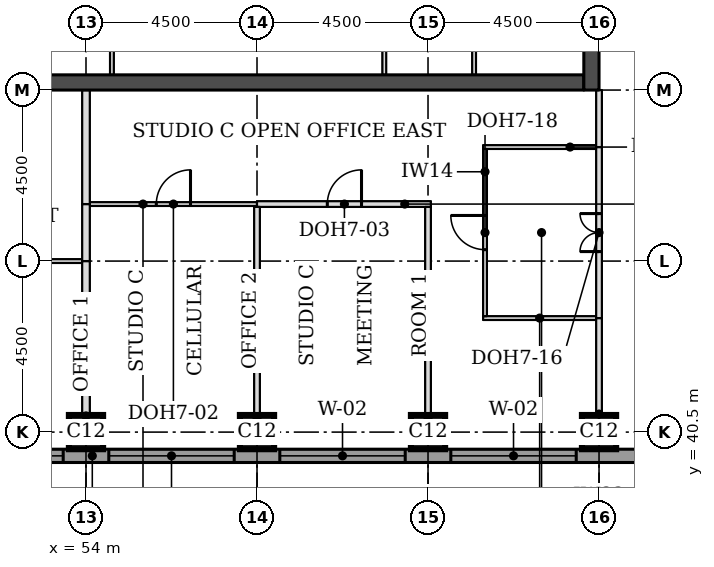
"""IFC4 building model, lengths in metres.
Left out: names, types, materials, properties, quantities, classifications, styles, units other than length and angle.
Written with IfcOpenShell. Run it as: python <this file> out.ifc"""

import sys

from ifc_helpers import new_model, si_unit, direction, frame, frame_2d, origin, origin_2d, place, context, subcontext, project, spatial, rectangle, extrude, element, fill, save


model = new_model("IFC4")
c1 = context("Model", 3, precision=1e-05, world=origin(), true_north=direction((0.0, 1.0)))
c2 = subcontext(c1, "Body", "Model", "MODEL_VIEW")
j1 = project(units=[si_unit("LENGTHUNIT", "METRE"), si_unit("PLANEANGLEUNIT", "RADIAN")], contexts=[c1])
p1 = place(None, origin())
s1 = spatial("IfcSite", under=j1, at=p1, CompositionType="ELEMENT")
p2 = place(p1, origin())
s2 = spatial("IfcBuilding", under=s1, at=p2, CompositionType="ELEMENT")
p3 = place(p2, frame((0.0, 0.0, 192.1)))
s3 = spatial("IfcBuildingStorey", under=s2, at=p3, CompositionType="ELEMENT", Elevation=192.1)
for number, where, z_axis, x_axis in (
    (1, (54.0, 40.5, 0.0), (0.0, 0.0, 1.0), (1.0, 0.0, 0.0)),
    (2, (58.5, 40.5, 0.0), (0.0, 0.0, 1.0), (1.0, 0.0, 0.0)),
    (3, (63.0, 40.5, 0.0), (0.0, 0.0, 1.0), (1.0, 0.0, 0.0)),
    (4, (67.5, 40.5, 0.0), (0.0, 0.0, 1.0), (1.0, 0.0, 0.0)),
):
    element("IfcColumn", number, at=place(p3, frame(where, z_axis=z_axis, x_axis=x_axis)), inside=s3, PredefinedType="COLUMN", context=c2, shape_type="SweptSolid", body=[
        extrude(rectangle(XDim=0.9, YDim=0.9, at=origin_2d()), origin(), (0.0, 0.0, 1.0), 3.7),
    ])
p4 = place(p3, frame((45.4, 49.7, 0.0), z_axis=(0.0, 0.0, 1.0), x_axis=(1.0, 0.0, 0.0)))
e5 = element("IfcWall", 5, at=p4, inside=s3, PredefinedType="SHEAR", context=c2, shape_type="SweptSolid", body=[
    extrude(rectangle(XDim=21.7, YDim=0.4, at=frame_2d((10.85, 0.0))), origin(), (0.0, 0.0, 1.0), 3.7),
])
p5 = place(p3, frame((67.3, 49.5, 0.0), z_axis=(0.0, 0.0, 1.0), x_axis=(0.0, 1.0, 0.0)))
e6 = element("IfcWall", 6, at=p5, inside=s3, PredefinedType="SHEAR", context=c2, shape_type="SweptSolid", body=[
    extrude(rectangle(XDim=22.5, YDim=0.4, at=frame_2d((11.25, 0.0))), origin(), (0.0, 0.0, 1.0), 3.7),
])
p6 = place(p5, frame((4.2, 0.0, 0.0)))
e7 = element("IfcOpeningElement", 7, at=p6, cuts=e6, PredefinedType="OPENING", context=c2, shape_type="SweptSolid", body=[
    extrude(rectangle(XDim=1.8, YDim=2.1, at=frame_2d((0.9, 1.05))), frame((0.0, 0.21, 0.0), z_axis=(0.0, -1.0, 0.0), x_axis=(1.0, 0.0, 0.0)), (0.0, 0.0, 1.0), 0.42),
])
p7 = place(p5, frame((6.9, 0.0, 0.0)))
e8 = element("IfcOpeningElement", 8, at=p7, cuts=e6, PredefinedType="OPENING", context=c2, shape_type="SweptSolid", body=[
    extrude(rectangle(XDim=1.1, YDim=2.1, at=frame_2d((0.55, 1.05))), frame((0.0, 0.21, 0.0), z_axis=(0.0, -1.0, 0.0), x_axis=(1.0, 0.0, 0.0)), (0.0, 0.0, 1.0), 0.42),
])
p8 = place(p5, frame((13.6, 0.0, 0.0)))
e9 = element("IfcOpeningElement", 9, at=p8, cuts=e6, PredefinedType="OPENING", context=c2, shape_type="SweptSolid", body=[
    extrude(rectangle(XDim=1.1, YDim=2.1, at=frame_2d((0.55, 1.05))), frame((0.0, 0.21, 0.0), z_axis=(0.0, -1.0, 0.0), x_axis=(1.0, 0.0, 0.0)), (0.0, 0.0, 1.0), 0.42),
])
p9 = place(p5, frame((16.5, 0.0, 0.0)))
e10 = element("IfcOpeningElement", 10, at=p9, cuts=e6, PredefinedType="OPENING", context=c2, shape_type="SweptSolid", body=[
    extrude(rectangle(XDim=1.8, YDim=2.1, at=frame_2d((0.9, 1.05))), frame((0.0, 0.21, 0.0), z_axis=(0.0, -1.0, 0.0), x_axis=(1.0, 0.0, 0.0)), (0.0, 0.0, 1.0), 0.42),
])
p10 = place(p3, frame((36.0, 39.875, 0.0), z_axis=(0.0, 0.0, 1.0), x_axis=(1.0, 0.0, 0.0)))
e11 = element("IfcWall", 11, at=p10, inside=s3, PredefinedType="STANDARD", context=c2, shape_type="SweptSolid", body=[
    extrude(rectangle(XDim=36.331, YDim=0.35, at=frame_2d((18.166, 0.0))), origin(), (0.0, 0.0, 1.0), 3.525),
])
p11 = place(p10, frame((5.1, 0.0, 0.9)))
e12 = element("IfcOpeningElement", 12, at=p11, cuts=e11, PredefinedType="OPENING", context=c2, shape_type="SweptSolid", body=[
    extrude(rectangle(XDim=3.3, YDim=1.9, at=frame_2d((1.65, 0.95))), frame((0.0, 0.185, 0.0), z_axis=(0.0, -1.0, 0.0), x_axis=(1.0, 0.0, 0.0)), (0.0, 0.0, 1.0), 0.37),
])
p12 = place(p10, frame((9.6, 0.0, 0.9)))
e13 = element("IfcOpeningElement", 13, at=p12, cuts=e11, PredefinedType="OPENING", context=c2, shape_type="SweptSolid", body=[
    extrude(rectangle(XDim=3.3, YDim=1.9, at=frame_2d((1.65, 0.95))), frame((0.0, 0.185, 0.0), z_axis=(0.0, -1.0, 0.0), x_axis=(1.0, 0.0, 0.0)), (0.0, 0.0, 1.0), 0.37),
])
p13 = place(p10, frame((14.1, 0.0, 0.9)))
e14 = element("IfcOpeningElement", 14, at=p13, cuts=e11, PredefinedType="OPENING", context=c2, shape_type="SweptSolid", body=[
    extrude(rectangle(XDim=3.3, YDim=1.9, at=frame_2d((1.65, 0.95))), frame((0.0, 0.185, 0.0), z_axis=(0.0, -1.0, 0.0), x_axis=(1.0, 0.0, 0.0)), (0.0, 0.0, 1.0), 0.37),
])
p14 = place(p10, frame((18.6, 0.0, 0.9)))
e15 = element("IfcOpeningElement", 15, at=p14, cuts=e11, PredefinedType="OPENING", context=c2, shape_type="SweptSolid", body=[
    extrude(rectangle(XDim=3.3, YDim=1.9, at=frame_2d((1.65, 0.95))), frame((0.0, 0.185, 0.0), z_axis=(0.0, -1.0, 0.0), x_axis=(1.0, 0.0, 0.0)), (0.0, 0.0, 1.0), 0.37),
])
p15 = place(p10, frame((23.1, 0.0, 0.9)))
e16 = element("IfcOpeningElement", 16, at=p15, cuts=e11, PredefinedType="OPENING", context=c2, shape_type="SweptSolid", body=[
    extrude(rectangle(XDim=3.3, YDim=1.9, at=frame_2d((1.65, 0.95))), frame((0.0, 0.185, 0.0), z_axis=(0.0, -1.0, 0.0), x_axis=(1.0, 0.0, 0.0)), (0.0, 0.0, 1.0), 0.37),
])
p16 = place(p10, frame((27.6, 0.0, 0.9)))
e17 = element("IfcOpeningElement", 17, at=p16, cuts=e11, PredefinedType="OPENING", context=c2, shape_type="SweptSolid", body=[
    extrude(rectangle(XDim=3.3, YDim=1.9, at=frame_2d((1.65, 0.95))), frame((0.0, 0.185, 0.0), z_axis=(0.0, -1.0, 0.0), x_axis=(1.0, 0.0, 0.0)), (0.0, 0.0, 1.0), 0.37),
])
p17 = place(p3, frame((64.45, 43.5, 0.0), z_axis=(0.0, 0.0, 1.0), x_axis=(1.0, 0.0, 0.0)))
e18 = element("IfcWall", 18, at=p17, inside=s3, PredefinedType="PARTITIONING", context=c2, shape_type="SweptSolid", body=[
    extrude(rectangle(XDim=2.975, YDim=0.1, at=frame_2d((1.488, 0.0))), origin(), (0.0, 0.0, 1.0), 3.55),
])
p18 = place(p3, frame((49.45, 45.0, 0.0), z_axis=(0.0, 0.0, 1.0), x_axis=(1.0, 0.0, 0.0)))
e19 = element("IfcWall", 19, at=p18, inside=s3, PredefinedType="PARTITIONING", context=c2, shape_type="SweptSolid", body=[
    extrude(rectangle(XDim=4.45, YDim=0.1, at=frame_2d((2.225, 0.0))), origin(), (0.0, 0.0, 1.0), 3.55),
])
p19 = place(p3, frame((54.1, 46.5, 0.0), z_axis=(0.0, 0.0, 1.0), x_axis=(1.0, 0.0, 0.0)))
e20 = element("IfcWall", 20, at=p19, inside=s3, PredefinedType="PARTITIONING", context=c2, shape_type="SweptSolid", body=[
    extrude(rectangle(XDim=4.4, YDim=0.1, at=frame_2d((2.2, 0.0))), origin(), (0.0, 0.0, 1.0), 3.55),
])
p20 = place(p19, frame((1.75, 0.0, 0.0)))
e21 = element("IfcOpeningElement", 21, at=p20, cuts=e20, PredefinedType="OPENING", context=c2, shape_type="SweptSolid", body=[
    extrude(rectangle(XDim=0.9, YDim=2.1, at=frame_2d((0.45, 1.05))), frame((0.0, 0.06, 0.0), z_axis=(0.0, -1.0, 0.0), x_axis=(1.0, 0.0, 0.0)), (0.0, 0.0, 1.0), 0.12),
])
p21 = place(p3, frame((58.5, 46.5, 0.0), z_axis=(0.0, 0.0, 1.0), x_axis=(1.0, 0.0, 0.0)))
e22 = element("IfcWall", 22, at=p21, inside=s3, PredefinedType="PARTITIONING", context=c2, shape_type="SweptSolid", body=[
    extrude(rectangle(XDim=4.575, YDim=0.15, at=frame_2d((2.288, 0.0))), origin(), (0.0, 0.0, 1.0), 3.55),
])
p22 = place(p21, frame((1.85, 0.0, 0.0)))
e23 = element("IfcOpeningElement", 23, at=p22, cuts=e22, PredefinedType="OPENING", context=c2, shape_type="SweptSolid", body=[
    extrude(rectangle(XDim=0.9, YDim=2.1, at=frame_2d((0.45, 1.05))), frame((0.0, 0.085, 0.0), z_axis=(0.0, -1.0, 0.0), x_axis=(1.0, 0.0, 0.0)), (0.0, 0.0, 1.0), 0.17),
])
p23 = place(p3, frame((64.45, 48.0, 0.0), z_axis=(0.0, 0.0, 1.0), x_axis=(1.0, 0.0, 0.0)))
e24 = element("IfcWall", 24, at=p23, inside=s3, PredefinedType="PARTITIONING", context=c2, shape_type="SweptSolid", body=[
    extrude(rectangle(XDim=2.975, YDim=0.1, at=frame_2d((1.488, 0.0))), origin(), (0.0, 0.0, 1.0), 3.55),
])
p24 = place(p3, frame((54.0, 40.05, 0.0), z_axis=(0.0, 0.0, 1.0), x_axis=(0.0, 1.0, 0.0)))
e25 = element("IfcWall", 25, at=p24, inside=s3, PredefinedType="PARTITIONING", context=c2, shape_type="SweptSolid", body=[
    extrude(rectangle(XDim=4.95, YDim=0.2, at=frame_2d((2.475, 0.0))), origin(), (0.0, 0.0, 1.0), 3.55),
])
for number, where, z_axis, x_axis in (
    (26, (58.5, 40.05, 0.0), (0.0, 0.0, 1.0), (0.0, 1.0, 0.0)),
    (27, (63.0, 40.05, 0.0), (0.0, 0.0, 1.0), (0.0, 1.0, 0.0)),
):
    element("IfcWall", number, at=place(p3, frame(where, z_axis=z_axis, x_axis=x_axis)), inside=s3, PredefinedType="PARTITIONING", context=c2, shape_type="SweptSolid", body=[
        extrude(rectangle(XDim=6.375, YDim=0.15, at=frame_2d((3.188, 0.0))), origin(), (0.0, 0.0, 1.0), 3.55),
    ])
p25 = place(p3, frame((67.5, 40.05, 0.0), z_axis=(0.0, 0.0, 1.0), x_axis=(0.0, 1.0, 0.0)))
e28 = element("IfcWall", 28, at=p25, inside=s3, PredefinedType="PARTITIONING", context=c2, shape_type="SweptSolid", body=[
    extrude(rectangle(XDim=3.45, YDim=0.15, at=frame_2d((1.725, 0.0))), origin(), (0.0, 0.0, 1.0), 3.022),
])
p26 = place(p3, frame((67.5, 43.5, 0.0), z_axis=(0.0, 0.0, 1.0), x_axis=(0.0, 1.0, 0.0)))
e29 = element("IfcWall", 29, at=p26, inside=s3, PredefinedType="PARTITIONING", context=c2, shape_type="SweptSolid", body=[
    extrude(rectangle(XDim=4.5, YDim=0.15, at=frame_2d((2.25, 0.0))), origin(), (0.0, 0.0, 1.0), 3.022),
])
p27 = place(p26, frame((1.75, 0.0, 0.0)))
e30 = element("IfcOpeningElement", 30, at=p27, cuts=e29, PredefinedType="OPENING", context=c2, shape_type="SweptSolid", body=[
    extrude(rectangle(XDim=1.0, YDim=2.1, at=frame_2d((0.5, 1.05))), frame((0.0, 0.085, 0.0), z_axis=(0.0, -1.0, 0.0), x_axis=(1.0, 0.0, 0.0)), (0.0, 0.0, 1.0), 0.17),
])
p28 = place(p3, frame((64.5, 43.55, 0.0), z_axis=(0.0, 0.0, 1.0), x_axis=(0.0, 1.0, 0.0)))
e31 = element("IfcWall", 31, at=p28, inside=s3, PredefinedType="PARTITIONING", context=c2, shape_type="SweptSolid", body=[
    extrude(rectangle(XDim=4.4, YDim=0.1, at=frame_2d((2.2, 0.0))), origin(), (0.0, 0.0, 1.0), 3.55),
])
p29 = place(p28, frame((1.75, 0.0, 0.0)))
e32 = element("IfcOpeningElement", 32, at=p29, cuts=e31, PredefinedType="OPENING", context=c2, shape_type="SweptSolid", body=[
    extrude(rectangle(XDim=0.9, YDim=2.1, at=frame_2d((0.45, 1.05))), frame((0.0, 0.06, 0.0), z_axis=(0.0, -1.0, 0.0), x_axis=(1.0, 0.0, 0.0)), (0.0, 0.0, 1.0), 0.12),
])
p30 = place(p3, frame((54.0, 45.0, 0.0), z_axis=(0.0, 0.0, 1.0), x_axis=(0.0, 1.0, 0.0)))
e33 = element("IfcWall", 33, at=p30, inside=s3, PredefinedType="PARTITIONING", context=c2, shape_type="SweptSolid", body=[
    extrude(rectangle(XDim=1.5, YDim=0.2, at=frame_2d((0.75, 0.0))), origin(), (0.0, 0.0, 1.0), 3.55),
])
p31 = place(p3, frame((54.0, 46.5, 0.0), z_axis=(0.0, 0.0, 1.0), x_axis=(0.0, 1.0, 0.0)))
e34 = element("IfcWall", 34, at=p31, inside=s3, PredefinedType="PARTITIONING", context=c2, shape_type="SweptSolid", body=[
    extrude(rectangle(XDim=3.0, YDim=0.2, at=frame_2d((1.5, 0.0))), origin(), (0.0, 0.0, 1.0), 3.55),
])
p32 = place(p3, frame((67.5, 48.0, 0.0), z_axis=(0.0, 0.0, 1.0), x_axis=(0.0, 1.0, 0.0)))
e35 = element("IfcWall", 35, at=p32, inside=s3, PredefinedType="PARTITIONING", context=c2, shape_type="SweptSolid", body=[
    extrude(rectangle(XDim=1.5, YDim=0.15, at=frame_2d((0.75, 0.0))), origin(), (0.0, 0.0, 1.0), 3.022),
])
for number, where, z_axis, x_axis in (
    (36, (54.682, 49.9, 0.0), (0.0, 0.0, 1.0), (0.0, 1.0, 0.0)),
    (37, (61.85, 49.9, 0.0), (0.0, 0.0, 1.0), (0.0, 1.0, 0.0)),
    (38, (64.212, 49.9, 0.0), (0.0, 0.0, 1.0), (0.0, 1.0, 0.0)),
):
    element("IfcWall", number, at=place(p3, frame(where, z_axis=z_axis, x_axis=x_axis)), inside=s3, PredefinedType="PARTITIONING", context=c2, shape_type="SweptSolid", body=[
        extrude(rectangle(XDim=3.1, YDim=0.1, at=frame_2d((1.55, 0.0))), origin(), (0.0, 0.0, 1.0), 3.55),
    ])
p33 = place(p13, origin())
e39 = element("IfcWindow", 39, at=p33, inside=s3, PartitioningType="SINGLE_PANEL", PredefinedType="WINDOW", context=c2, shape_type="SweptSolid", body=[
    extrude(rectangle(XDim=3.3, YDim=1.9, at=frame_2d((1.65, 0.95))), frame((0.0, 0.085, 0.0), z_axis=(0.0, -1.0, 0.0), x_axis=(1.0, 0.0, 0.0)), (0.0, 0.0, 1.0), 0.06),
])
fill(e14, e39)
p34 = place(p14, origin())
e40 = element("IfcWindow", 40, at=p34, inside=s3, PartitioningType="SINGLE_PANEL", PredefinedType="WINDOW", context=c2, shape_type="SweptSolid", body=[
    extrude(rectangle(XDim=3.3, YDim=1.9, at=frame_2d((1.65, 0.95))), frame((0.0, 0.085, 0.0), z_axis=(0.0, -1.0, 0.0), x_axis=(1.0, 0.0, 0.0)), (0.0, 0.0, 1.0), 0.06),
])
fill(e15, e40)
p35 = place(p15, origin())
e41 = element("IfcWindow", 41, at=p35, inside=s3, PartitioningType="SINGLE_PANEL", PredefinedType="WINDOW", context=c2, shape_type="SweptSolid", body=[
    extrude(rectangle(XDim=3.3, YDim=1.9, at=frame_2d((1.65, 0.95))), frame((0.0, 0.085, 0.0), z_axis=(0.0, -1.0, 0.0), x_axis=(1.0, 0.0, 0.0)), (0.0, 0.0, 1.0), 0.06),
])
fill(e16, e41)
p36 = place(p16, origin())
e42 = element("IfcWindow", 42, at=p36, inside=s3, PartitioningType="SINGLE_PANEL", PredefinedType="WINDOW", context=c2, shape_type="SweptSolid", body=[
    extrude(rectangle(XDim=3.3, YDim=1.9, at=frame_2d((1.65, 0.95))), frame((0.0, 0.085, 0.0), z_axis=(0.0, -1.0, 0.0), x_axis=(1.0, 0.0, 0.0)), (0.0, 0.0, 1.0), 0.06),
])
fill(e17, e42)
p37 = place(p27, origin())
e43 = element("IfcDoor", 43, at=p37, inside=s3, OperationType="DOUBLE_DOOR_SINGLE_SWING", PredefinedType="DOOR", context=c2, shape_type="SweptSolid", body=[
    extrude(rectangle(XDim=1.0, YDim=2.1, at=frame_2d((0.5, 1.05))), frame((0.0, 0.025, 0.0), z_axis=(0.0, -1.0, 0.0), x_axis=(1.0, 0.0, 0.0)), (0.0, 0.0, 1.0), 0.05),
])
fill(e30, e43)
p38 = place(p29, origin())
e44 = element("IfcDoor", 44, at=p38, inside=s3, OperationType="SINGLE_SWING_RIGHT", PredefinedType="DOOR", context=c2, shape_type="SweptSolid", body=[
    extrude(rectangle(XDim=0.9, YDim=2.1, at=frame_2d((0.45, 1.05))), frame((0.0, 0.025, 0.0), z_axis=(0.0, -1.0, 0.0), x_axis=(1.0, 0.0, 0.0)), (0.0, 0.0, 1.0), 0.05),
])
fill(e32, e44)
p39 = place(p20, origin())
e45 = element("IfcDoor", 45, at=p39, inside=s3, OperationType="SINGLE_SWING_RIGHT", PredefinedType="DOOR", context=c2, shape_type="SweptSolid", body=[
    extrude(rectangle(XDim=0.9, YDim=2.1, at=frame_2d((0.45, 1.05))), frame((0.0, 0.025, 0.0), z_axis=(0.0, -1.0, 0.0), x_axis=(1.0, 0.0, 0.0)), (0.0, 0.0, 1.0), 0.05),
])
fill(e21, e45)
p40 = place(p22, origin())
e46 = element("IfcDoor", 46, at=p40, inside=s3, OperationType="SINGLE_SWING_RIGHT", PredefinedType="DOOR", context=c2, shape_type="SweptSolid", body=[
    extrude(rectangle(XDim=0.9, YDim=2.1, at=frame_2d((0.45, 1.05))), frame((0.0, 0.025, 0.0), z_axis=(0.0, -1.0, 0.0), x_axis=(1.0, 0.0, 0.0)), (0.0, 0.0, 1.0), 0.05),
])
fill(e23, e46)
save(model, sys.argv[1])
